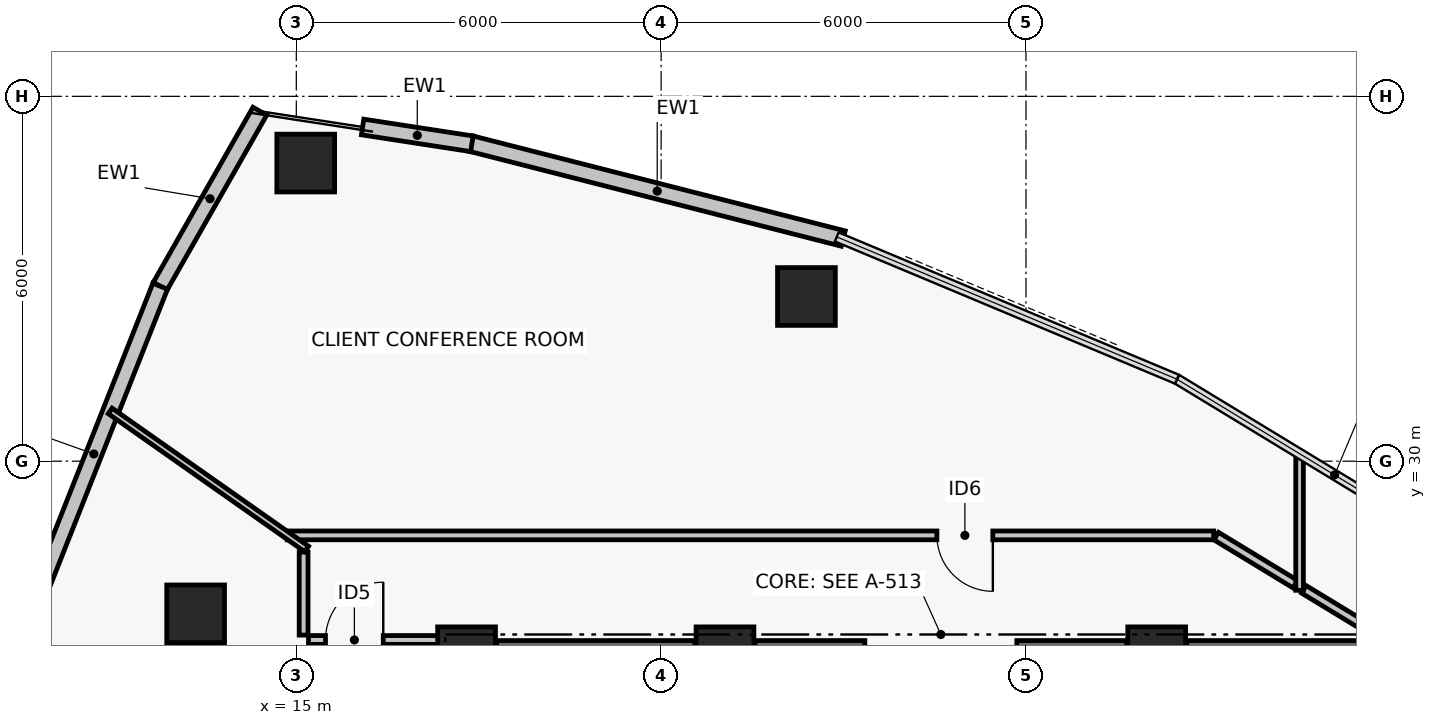
"""IFC4 building model, lengths in metres.
Left out: names, types, materials, properties, quantities, classifications, styles, units other than length and angle.
Written with IfcOpenShell. Run it as: python <this file> out.ifc"""

import sys

from ifc_helpers import new_model, si_unit, direction, frame, frame_2d, origin, origin_2d, place, context, subcontext, project, spatial, rectangle, hollow_rectangle, extrude, element, fill, save


model = new_model("IFC4")
c1 = context("Model", 3, precision=1e-05, world=origin(), true_north=direction((0.0, 1.0)))
c2 = subcontext(c1, "Body", "Model", "MODEL_VIEW")
j1 = project(units=[si_unit("LENGTHUNIT", "METRE"), si_unit("PLANEANGLEUNIT", "RADIAN")], contexts=[c1])
p1 = place(None, origin())
s1 = spatial("IfcSite", under=j1, at=p1, CompositionType="ELEMENT")
p2 = place(p1, origin())
s2 = spatial("IfcBuilding", under=s1, at=p2, CompositionType="ELEMENT")
p3 = place(p2, frame((0.0, 0.0, 172.92)))
s3 = spatial("IfcBuildingStorey", under=s2, at=p3, CompositionType="ELEMENT", Elevation=172.92)
for number, where, z_axis, x_axis in (
    (1, (17.8, 26.8, 0.0), (0.0, 0.0, 1.0), (1.0, 0.0, 0.0)),
    (2, (22.05, 26.8, 0.0), (0.0, 0.0, 1.0), (1.0, 0.0, 0.0)),
    (3, (29.15, 26.8, 0.0), (0.0, 0.0, 1.0), (1.0, 0.0, 0.0)),
):
    element("IfcColumn", number, at=place(p3, frame(where, z_axis=z_axis, x_axis=x_axis)), inside=s3, PredefinedType="COLUMN", context=c2, shape_type="SweptSolid", body=[
        extrude(rectangle(XDim=0.95, YDim=0.95, at=origin_2d()), origin(), (0.0, 0.0, 1.0), 3.72),
    ])
p4 = place(p3, frame((18.295, 26.8, 0.0), z_axis=(0.0, 0.0, 1.0), x_axis=(1.0, 0.0, 0.0)))
e4 = element("IfcWall", 4, at=p4, inside=s3, PredefinedType="SHEAR", context=c2, shape_type="SweptSolid", body=[
    extrude(rectangle(XDim=3.26, YDim=0.5, at=frame_2d((1.63, 0.0))), origin(), (0.0, 0.0, 1.0), 3.5),
])
p5 = place(p3, frame((22.545, 26.8, 0.0), z_axis=(0.0, 0.0, 1.0), x_axis=(1.0, 0.0, 0.0)))
e5 = element("IfcWall", 5, at=p5, inside=s3, PredefinedType="SHEAR", context=c2, shape_type="SweptSolid", body=[
    extrude(rectangle(XDim=1.805, YDim=0.5, at=frame_2d((0.903, 0.0))), origin(), (0.0, 0.0, 1.0), 3.5),
])
p6 = place(p3, frame((26.85, 26.8, 0.0), z_axis=(0.0, 0.0, 1.0), x_axis=(1.0, 0.0, 0.0)))
e6 = element("IfcWall", 6, at=p6, inside=s3, PredefinedType="SHEAR", context=c2, shape_type="SweptSolid", body=[
    extrude(rectangle(XDim=1.805, YDim=0.5, at=frame_2d((0.902, 0.0))), origin(), (0.0, 0.0, 1.0), 3.5),
])
p7 = place(p3, frame((29.645, 26.8, 0.0), z_axis=(0.0, 0.0, 1.0), x_axis=(1.0, 0.0, 0.0)))
e7 = element("IfcWall", 7, at=p7, inside=s3, PredefinedType="SHEAR", context=c2, shape_type="SweptSolid", body=[
    extrude(rectangle(XDim=3.26, YDim=0.5, at=frame_2d((1.63, 0.0))), origin(), (0.0, 0.0, 1.0), 3.5),
])
for number, where, z_axis, x_axis in (
    (8, (23.389, 32.708, 0.0), (0.0, 0.0, 1.0), (1.0, 0.0, 0.0)),
    (9, (15.155, 34.903, 0.0), (0.0, 0.0, 1.0), (1.0, 0.0, 0.0)),
    (10, (13.344, 27.489, 0.0), (0.0, 0.0, 1.0), (1.0, 0.0, 0.0)),
):
    element("IfcColumn", number, at=place(p3, frame(where, z_axis=z_axis, x_axis=x_axis)), inside=s3, PredefinedType="COLUMN", context=c2, shape_type="SweptSolid", body=[
        extrude(hollow_rectangle(XDim=0.95, YDim=0.95, WallThickness=0.04, at=origin_2d()), origin(), (0.0, 0.0, 1.0), 3.72),
    ])
p8 = place(p3, frame((17.876, 35.222, 0.0), z_axis=(0.0, 0.0, 1.0), x_axis=(0.968976240439, -0.247153890246, 0.0)))
e11 = element("IfcWall", 11, at=p8, inside=s3, PredefinedType="PARTITIONING", context=c2, shape_type="SweptSolid", body=[
    extrude(rectangle(XDim=6.315, YDim=0.26, at=frame_2d((3.157, 0.0))), origin(), (0.0, 0.0, 1.0), 3.5),
])
p9 = place(p3, frame((16.091, 35.496, 0.0), z_axis=(0.0, 0.0, 1.0), x_axis=(0.988377906791, -0.15201681936, 0.0)))
e12 = element("IfcWall", 12, at=p9, inside=s3, PredefinedType="PARTITIONING", context=c2, shape_type="SweptSolid", body=[
    extrude(rectangle(XDim=1.818, YDim=0.26, at=frame_2d((0.909, 0.0))), origin(), (0.0, 0.0, 1.0), 3.5),
])
p10 = place(p3, frame((12.761, 32.878, 0.0), z_axis=(0.0, 0.0, 1.0), x_axis=(0.494884228667, 0.86895891745, 0.0)))
e13 = element("IfcWall", 13, at=p10, inside=s3, PredefinedType="PARTITIONING", context=c2, shape_type="SweptSolid", body=[
    extrude(rectangle(XDim=3.312, YDim=0.26, at=frame_2d((1.656, 0.0))), origin(), (0.0, 0.0, 1.0), 3.5),
])
p11 = place(p3, frame((10.579, 27.36, 0.0), z_axis=(0.0, 0.0, 1.0), x_axis=(0.367819433119, 0.929897233365, 0.0)))
e14 = element("IfcWall", 14, at=p11, inside=s3, PredefinedType="PARTITIONING", context=c2, shape_type="SweptSolid", body=[
    extrude(rectangle(XDim=5.933, YDim=0.26, at=frame_2d((2.967, 0.0))), origin(), (0.0, 0.0, 1.0), 3.5),
])
p12 = place(p3, frame((32.677, 27.22, 0.0), z_axis=(0.0, 0.0, 1.0), x_axis=(-0.854620308946, 0.51925343286, 0.0)))
e15 = element("IfcWall", 15, at=p12, inside=s3, PredefinedType="PARTITIONING", context=c2, shape_type="SweptSolid", body=[
    extrude(rectangle(XDim=1.296, YDim=0.145, at=frame_2d((0.648, 0.0))), origin(), (0.0, 0.0, 1.0), 2.63),
])
p13 = place(p3, frame((31.43, 27.978, 0.0), z_axis=(0.0, 0.0, 1.0), x_axis=(-0.854650301125, 0.519204066612, 0.0)))
e16 = element("IfcWall", 16, at=p13, inside=s3, PredefinedType="PARTITIONING", context=c2, shape_type="SweptSolid", body=[
    extrude(rectangle(XDim=1.522, YDim=0.145, at=frame_2d((0.761, 0.0))), origin(), (0.0, 0.0, 1.0), 2.93),
])
p14 = place(p3, frame((30.087, 28.78, 0.0), z_axis=(0.0, 0.0, 1.0), x_axis=(-1.0, 0.0, 0.0)))
e17 = element("IfcWall", 17, at=p14, inside=s3, PredefinedType="PARTITIONING", context=c2, shape_type="SweptSolid", body=[
    extrude(rectangle(XDim=15.236, YDim=0.145, at=frame_2d((7.618, 0.0))), origin(), (0.0, 0.0, 1.0), 2.73),
])
p15 = place(p14, frame((3.632, 0.0, 0.0)))
e18 = element("IfcOpeningElement", 18, at=p15, cuts=e17, PredefinedType="OPENING", context=c2, shape_type="SweptSolid", body=[
    extrude(rectangle(XDim=0.92, YDim=2.05, at=frame_2d((0.46, 1.025))), frame((0.0, 0.083, 0.0), z_axis=(0.0, -1.0, 0.0), x_axis=(1.0, 0.0, 0.0)), (0.0, 0.0, 1.0), 0.165),
])
p16 = place(p3, frame((15.12, 28.506, 0.0), z_axis=(0.0, 0.0, 1.0), x_axis=(0.0, -1.0, 0.0)))
e19 = element("IfcWall", 19, at=p16, inside=s3, PredefinedType="PARTITIONING", context=c2, shape_type="SweptSolid", body=[
    extrude(rectangle(XDim=1.366, YDim=0.145, at=frame_2d((0.683, 0.0))), origin(), (0.0, 0.0, 1.0), 2.73),
])
p17 = place(p3, frame((15.2, 27.06, 0.0), z_axis=(0.0, 0.0, 1.0), x_axis=(1.0, 0.0, 0.0)))
e20 = element("IfcWall", 20, at=p17, inside=s3, PredefinedType="PARTITIONING", context=c2, shape_type="SweptSolid", body=[
    extrude(rectangle(XDim=2.18, YDim=0.145, at=frame_2d((1.09, 0.0))), origin(), (0.0, 0.0, 1.0), 2.73),
])
p18 = place(p17, frame((0.28, 0.0, 0.0)))
e21 = element("IfcOpeningElement", 21, at=p18, cuts=e20, PredefinedType="OPENING", context=c2, shape_type="SweptSolid", body=[
    extrude(rectangle(XDim=0.95, YDim=2.06, at=frame_2d((0.475, 1.03))), frame((0.0, 0.083, 0.0), z_axis=(0.0, -1.0, 0.0), x_axis=(1.0, 0.0, 0.0)), (0.0, 0.0, 1.0), 0.165),
])
p19 = place(p3, frame((31.5, 27.877, 0.0), z_axis=(0.0, 0.0, 1.0), x_axis=(0.0, 1.0, 0.0)))
e22 = element("IfcWall", 22, at=p19, inside=s3, PredefinedType="PARTITIONING", context=c2, shape_type="SweptSolid", body=[
    extrude(rectangle(XDim=2.258, YDim=0.125, at=frame_2d((1.129, 0.0))), origin(), (0.0, 0.0, 1.0), 2.93),
])
p20 = place(p3, frame((11.939, 30.826, 0.0), z_axis=(0.0, 0.0, 1.0), x_axis=(0.81818776637, -0.574951110063, 0.0)))
e23 = element("IfcWall", 23, at=p20, inside=s3, PredefinedType="PARTITIONING", context=c2, shape_type="SweptSolid", body=[
    extrude(rectangle(XDim=3.949, YDim=0.11, at=frame_2d((1.974, 0.0))), origin(), (0.0, 0.0, 1.0), 2.93),
])
p21 = place(p15, origin())
e24 = element("IfcDoor", 24, at=p21, inside=s3, OperationType="SINGLE_SWING_LEFT", PredefinedType="DOOR", context=c2, shape_type="SweptSolid", body=[
    extrude(rectangle(XDim=0.92, YDim=2.05, at=frame_2d((0.46, 1.025))), frame((0.0, 0.025, 0.0), z_axis=(0.0, -1.0, 0.0), x_axis=(1.0, 0.0, 0.0)), (0.0, 0.0, 1.0), 0.05),
])
fill(e18, e24)
p22 = place(p18, origin())
e25 = element("IfcDoor", 25, at=p22, inside=s3, OperationType="SINGLE_SWING_RIGHT", PredefinedType="DOOR", context=c2, shape_type="SweptSolid", body=[
    extrude(rectangle(XDim=0.95, YDim=2.06, at=frame_2d((0.475, 1.03))), frame((0.0, 0.025, 0.0), z_axis=(0.0, -1.0, 0.0), x_axis=(1.0, 0.0, 0.0)), (0.0, 0.0, 1.0), 0.05),
])
fill(e21, e25)
save(model, sys.argv[1])
